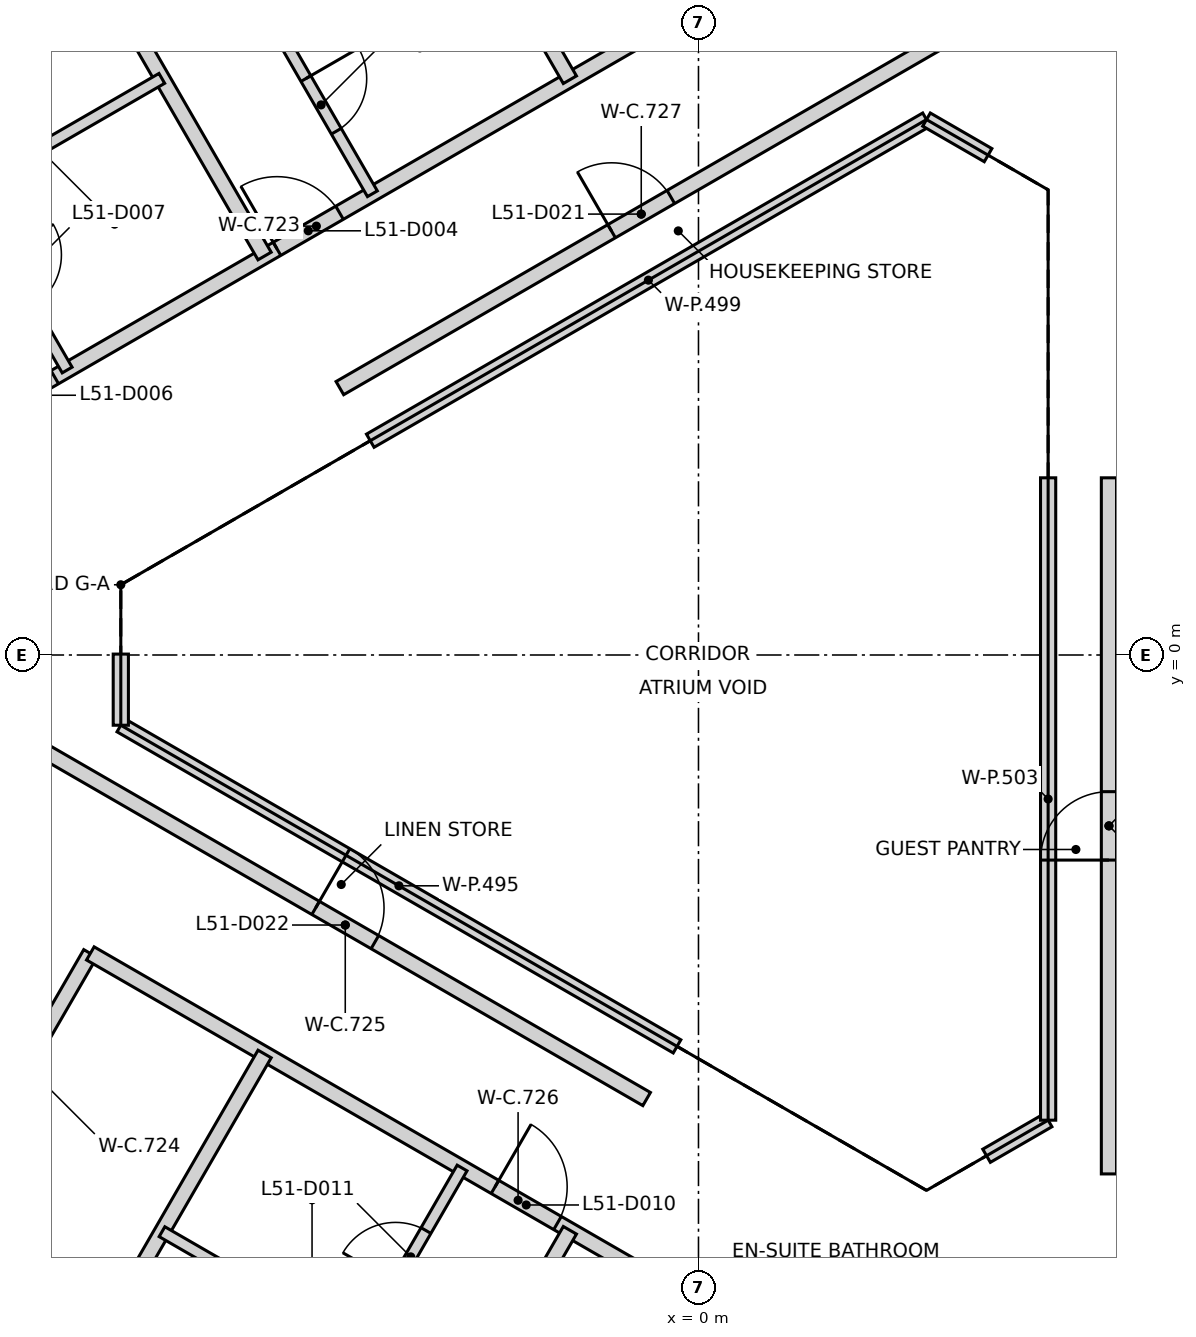
"""IFC4 building model, lengths in metres.
Left out: names, types, materials, properties, quantities, classifications, styles, units other than length and angle.
Written with IfcOpenShell. Run it as: python <this file> out.ifc"""

import sys

from ifc_helpers import new_model, si_unit, direction, frame, frame_2d, origin, place, context, subcontext, project, spatial, rectangle, extrude, element, fill, save


model = new_model("IFC4")
c1 = context("Model", 3, precision=1e-05, world=origin(), true_north=direction((0.0, 1.0)))
c2 = subcontext(c1, "Body", "Model", "MODEL_VIEW")
j1 = project(units=[si_unit("LENGTHUNIT", "METRE"), si_unit("PLANEANGLEUNIT", "RADIAN")], contexts=[c1])
p1 = place(None, origin())
s1 = spatial("IfcSite", under=j1, at=p1, CompositionType="ELEMENT")
p2 = place(p1, origin())
s2 = spatial("IfcBuilding", under=s1, at=p2, CompositionType="ELEMENT")
p3 = place(p2, frame((0.0, 0.0, 204.4)))
s3 = spatial("IfcBuildingStorey", under=s2, at=p3, CompositionType="ELEMENT", Elevation=204.4)
p4 = place(p3, frame((10.42, 6.498, 0.0), z_axis=(0.0, 0.0, 1.0), x_axis=(-0.866021906294, 0.500006057782, 0.0)))
e1 = element("IfcWall", 1, at=p4, inside=s3, PredefinedType="SHEAR", context=c2, shape_type="SweptSolid", body=[
    extrude(rectangle(XDim=11.55, YDim=0.25, at=frame_2d((5.775, 0.0))), origin(), (0.0, 0.0, 1.0), 3.25),
])
p5 = place(p4, frame((10.025, 0.0, 0.0)))
e2 = element("IfcOpeningElement", 2, at=p5, cuts=e1, PredefinedType="OPENING", context=c2, shape_type="SweptSolid", body=[
    extrude(rectangle(XDim=1.2, YDim=2.1, at=frame_2d((0.6, 1.05))), frame((0.0, 0.135, 0.0), z_axis=(0.0, -1.0, 0.0), x_axis=(1.0, 0.0, 0.0)), (0.0, 0.0, 1.0), 0.27),
])
p6 = place(p4, frame((8.725, 0.0, 0.0)))
e3 = element("IfcOpeningElement", 3, at=p6, cuts=e1, PredefinedType="OPENING", context=c2, shape_type="SweptSolid", body=[
    extrude(rectangle(XDim=1.2, YDim=2.1, at=frame_2d((0.6, 1.05))), frame((0.0, 0.135, 0.0), z_axis=(0.0, -1.0, 0.0), x_axis=(1.0, 0.0, 0.0)), (0.0, 0.0, 1.0), 0.27),
])
p7 = place(p3, frame((0.417, -12.273, 0.0), z_axis=(0.0, 0.0, 1.0), x_axis=(0.866021906294, 0.500006057782, 0.0)))
e4 = element("IfcWall", 4, at=p7, inside=s3, PredefinedType="SHEAR", context=c2, shape_type="SweptSolid", body=[
    extrude(rectangle(XDim=11.55, YDim=0.25, at=frame_2d((5.775, 0.0))), origin(), (0.0, 0.0, 1.0), 3.25),
])
p8 = place(p7, frame((10.025, 0.0, 0.0)))
e5 = element("IfcOpeningElement", 5, at=p8, cuts=e4, PredefinedType="OPENING", context=c2, shape_type="SweptSolid", body=[
    extrude(rectangle(XDim=1.2, YDim=2.1, at=frame_2d((0.6, 1.05))), frame((0.0, 0.135, 0.0), z_axis=(0.0, -1.0, 0.0), x_axis=(1.0, 0.0, 0.0)), (0.0, 0.0, 1.0), 0.27),
])
p9 = place(p7, frame((8.725, 0.0, 0.0)))
e6 = element("IfcOpeningElement", 6, at=p9, cuts=e4, PredefinedType="OPENING", context=c2, shape_type="SweptSolid", body=[
    extrude(rectangle(XDim=1.2, YDim=2.1, at=frame_2d((0.6, 1.05))), frame((0.0, 0.135, 0.0), z_axis=(0.0, -1.0, 0.0), x_axis=(1.0, 0.0, 0.0)), (0.0, 0.0, 1.0), 0.27),
])
p10 = place(p3, frame((-10.652, 2.394, 0.0), z_axis=(0.0, 0.0, 1.0), x_axis=(0.866016271077, 0.500015817979, 0.0)))
e7 = element("IfcWall", 7, at=p10, inside=s3, PredefinedType="PARTITIONING", context=c2, shape_type="SweptSolid", body=[
    extrude(rectangle(XDim=12.991, YDim=0.2, at=frame_2d((6.495, 0.0))), origin(), (0.0, 0.0, 1.0), 3.25),
])
p11 = place(p10, frame((5.898, 0.0, 0.0)))
e8 = element("IfcOpeningElement", 8, at=p11, cuts=e7, PredefinedType="OPENING", context=c2, shape_type="SweptSolid", body=[
    extrude(rectangle(XDim=0.95, YDim=2.1, at=frame_2d((0.475, 1.05))), frame((0.0, 0.11, 0.0), z_axis=(0.0, -1.0, 0.0), x_axis=(1.0, 0.0, 0.0)), (0.0, 0.0, 1.0), 0.22),
])
p12 = place(p10, frame((1.571, 0.0, 0.0)))
e9 = element("IfcOpeningElement", 9, at=p12, cuts=e7, PredefinedType="OPENING", context=c2, shape_type="SweptSolid", body=[
    extrude(rectangle(XDim=0.95, YDim=2.1, at=frame_2d((0.475, 1.05))), frame((0.0, 0.11, 0.0), z_axis=(0.0, -1.0, 0.0), x_axis=(1.0, 0.0, 0.0)), (0.0, 0.0, 1.0), 0.22),
])
p13 = place(p3, frame((-9.697, -6.864, 0.0), z_axis=(0.0, 0.0, 1.0), x_axis=(0.499955030392, 0.866051365443, 0.0)))
e10 = element("IfcWall", 10, at=p13, inside=s3, PredefinedType="PARTITIONING", context=c2, shape_type="SweptSolid", body=[
    extrude(rectangle(XDim=3.392, YDim=0.2, at=frame_2d((1.696, 0.0))), origin(), (0.0, 0.0, 1.0), 3.25),
])
p14 = place(p13, frame((1.196, 0.0, 0.0)))
e11 = element("IfcOpeningElement", 11, at=p14, cuts=e10, PredefinedType="OPENING", context=c2, shape_type="SweptSolid", body=[
    extrude(rectangle(XDim=1.0, YDim=2.1, at=frame_2d((0.5, 1.05))), frame((0.0, 0.11, 0.0), z_axis=(0.0, -1.0, 0.0), x_axis=(1.0, 0.0, 0.0)), (0.0, 0.0, 1.0), 0.22),
])
p15 = place(p3, frame((-8.612, -1.263, 0.0), z_axis=(0.0, 0.0, 1.0), x_axis=(0.865996442381, -0.500050159267, 0.0)))
e12 = element("IfcWall", 12, at=p15, inside=s3, PredefinedType="PARTITIONING", context=c2, shape_type="SweptSolid", body=[
    extrude(rectangle(XDim=9.157, YDim=0.2, at=frame_2d((4.579, 0.0))), origin(), (0.0, 0.0, 1.0), 3.25),
])
p16 = place(p15, frame((4.128, 0.0, 0.0)))
e13 = element("IfcOpeningElement", 13, at=p16, cuts=e12, PredefinedType="OPENING", context=c2, shape_type="SweptSolid", body=[
    extrude(rectangle(XDim=0.9, YDim=2.1, at=frame_2d((0.45, 1.05))), frame((0.0, 0.11, 0.0), z_axis=(0.0, -1.0, 0.0), x_axis=(1.0, 0.0, 0.0)), (0.0, 0.0, 1.0), 0.22),
])
p17 = place(p3, frame((-8.001, -3.926, 0.0), z_axis=(0.0, 0.0, 1.0), x_axis=(0.866131158271, -0.499816783104, 0.0)))
e14 = element("IfcWall", 14, at=p17, inside=s3, PredefinedType="PARTITIONING", context=c2, shape_type="SweptSolid", body=[
    extrude(rectangle(XDim=12.995, YDim=0.2, at=frame_2d((6.498, 0.0))), origin(), (0.0, 0.0, 1.0), 3.25),
])
p18 = place(p17, frame((6.146, 0.0, 0.0)))
e15 = element("IfcOpeningElement", 15, at=p18, cuts=e14, PredefinedType="OPENING", context=c2, shape_type="SweptSolid", body=[
    extrude(rectangle(XDim=0.95, YDim=2.1, at=frame_2d((0.475, 1.05))), frame((0.0, 0.11, 0.0), z_axis=(0.0, -1.0, 0.0), x_axis=(1.0, 0.0, 0.0)), (0.0, 0.0, 1.0), 0.22),
])
p19 = place(p17, frame((10.472, 0.0, 0.0)))
e16 = element("IfcOpeningElement", 16, at=p19, cuts=e14, PredefinedType="OPENING", context=c2, shape_type="SweptSolid", body=[
    extrude(rectangle(XDim=0.95, YDim=2.1, at=frame_2d((0.475, 1.05))), frame((0.0, 0.11, 0.0), z_axis=(0.0, -1.0, 0.0), x_axis=(1.0, 0.0, 0.0)), (0.0, 0.0, 1.0), 0.22),
])
p20 = place(p3, frame((-4.718, 3.511, 0.0), z_axis=(0.0, 0.0, 1.0), x_axis=(0.865989775611, 0.500061704731, 0.0)))
e17 = element("IfcWall", 17, at=p20, inside=s3, PredefinedType="PARTITIONING", context=c2, shape_type="SweptSolid", body=[
    extrude(rectangle(XDim=9.157, YDim=0.2, at=frame_2d((4.579, 0.0))), origin(), (0.0, 0.0, 1.0), 3.25),
])
p21 = place(p20, frame((4.128, 0.0, 0.0)))
e18 = element("IfcOpeningElement", 18, at=p21, cuts=e17, PredefinedType="OPENING", context=c2, shape_type="SweptSolid", body=[
    extrude(rectangle(XDim=0.9, YDim=2.1, at=frame_2d((0.45, 1.05))), frame((0.0, 0.11, 0.0), z_axis=(0.0, -1.0, 0.0), x_axis=(1.0, 0.0, 0.0)), (0.0, 0.0, 1.0), 0.22),
])
p22 = place(p3, frame((5.4, -6.827, 0.0), z_axis=(0.0, 0.0, 1.0), x_axis=(0.0, 1.0, 0.0)))
e19 = element("IfcWall", 19, at=p22, inside=s3, PredefinedType="PARTITIONING", context=c2, shape_type="SweptSolid", body=[
    extrude(rectangle(XDim=9.158, YDim=0.2, at=frame_2d((4.579, 0.0))), origin(), (0.0, 0.0, 1.0), 3.25),
])
p23 = place(p22, frame((4.129, 0.0, 0.0)))
e20 = element("IfcOpeningElement", 20, at=p23, cuts=e19, PredefinedType="OPENING", context=c2, shape_type="SweptSolid", body=[
    extrude(rectangle(XDim=0.9, YDim=2.1, at=frame_2d((0.45, 1.05))), frame((0.0, 0.11, 0.0), z_axis=(0.0, -1.0, 0.0), x_axis=(1.0, 0.0, 0.0)), (0.0, 0.0, 1.0), 0.22),
])
for number, where, z_axis, x_axis in (
    (21, (-11.661, -15.561, 0.0), (0.0, 0.0, 1.0), (0.5, 0.866, 0.0)),
    (22, (-11.661, 15.561, 0.0), (0.0, 0.0, 1.0), (0.5, -0.866, 0.0)),
):
    element("IfcWall", number, at=place(p3, frame(where, z_axis=z_axis, x_axis=x_axis)), inside=s3, PredefinedType="PARTITIONING", context=c2, shape_type="SweptSolid", body=[
        extrude(rectangle(XDim=11.907, YDim=0.2, at=frame_2d((5.953, 0.0))), origin(), (0.0, 0.0, 1.0), 3.25),
    ])
p24 = place(p3, frame((-7.6, -0.924, 0.0), z_axis=(0.0, 0.0, 1.0), x_axis=(0.866038843867, -0.499976720371, 0.0)))
e23 = element("IfcWall", 23, at=p24, inside=s3, PredefinedType="PARTITIONING", context=c2, shape_type="SweptSolid", body=[
    extrude(rectangle(XDim=8.45, YDim=0.2, at=frame_2d((4.225, 0.0))), origin(), (0.0, 0.0, 1.0), 3.25),
])
p25 = place(p3, frame((-7.6, -0.924, 0.0), z_axis=(0.0, 0.0, 1.0), x_axis=(0.0, 1.0, 0.0)))
e24 = element("IfcWall", 24, at=p25, inside=s3, PredefinedType="PARTITIONING", context=c2, shape_type="SweptSolid", body=[
    extrude(rectangle(XDim=0.936, YDim=0.2, at=frame_2d((0.468, 0.0))), origin(), (0.0, 0.0, 1.0), 3.25),
])
for number, where, z_axis, x_axis in (
    (25, (-7.646, -17.879, 0.0), (0.0, 0.0, 1.0), (0.5, 0.866, 0.0)),
    (26, (-7.646, 17.879, 0.0), (0.0, 0.0, 1.0), (0.5, -0.866, 0.0)),
):
    element("IfcWall", number, at=place(p3, frame(where, z_axis=z_axis, x_axis=x_axis)), inside=s3, PredefinedType="PARTITIONING", context=c2, shape_type="SweptSolid", body=[
        extrude(rectangle(XDim=11.906, YDim=0.2, at=frame_2d((5.953, 0.0))), origin(), (0.0, 0.0, 1.0), 3.25),
    ])
p26 = place(p3, frame((-4.318, 2.819, 0.0), z_axis=(0.0, 0.0, 1.0), x_axis=(0.866038843867, 0.499976720371, 0.0)))
e27 = element("IfcWall", 27, at=p26, inside=s3, PredefinedType="PARTITIONING", context=c2, shape_type="SweptSolid", body=[
    extrude(rectangle(XDim=8.45, YDim=0.2, at=frame_2d((4.225, 0.0))), origin(), (0.0, 0.0, 1.0), 3.25),
])
p27 = place(p3, frame((3.0, 7.044, 0.0), z_axis=(0.0, 0.0, 1.0), x_axis=(0.865872609263, -0.500264554538, 0.0)))
e28 = element("IfcWall", 28, at=p27, inside=s3, PredefinedType="PARTITIONING", context=c2, shape_type="SweptSolid", body=[
    extrude(rectangle(XDim=0.936, YDim=0.2, at=frame_2d((0.468, 0.0))), origin(), (0.0, 0.0, 1.0), 3.25),
])
p28 = place(p3, frame((3.79, -6.588, 0.0), z_axis=(0.0, 0.0, 1.0), x_axis=(0.865985641702, 0.500068863623, 0.0)))
e29 = element("IfcWall", 29, at=p28, inside=s3, PredefinedType="PARTITIONING", context=c2, shape_type="SweptSolid", body=[
    extrude(rectangle(XDim=0.935, YDim=0.2, at=frame_2d((0.468, 0.0))), origin(), (0.0, 0.0, 1.0), 3.25),
])
p29 = place(p3, frame((4.6, -6.12, 0.0), z_axis=(0.0, 0.0, 1.0), x_axis=(0.0, 1.0, 0.0)))
e30 = element("IfcWall", 30, at=p29, inside=s3, PredefinedType="PARTITIONING", context=c2, shape_type="SweptSolid", body=[
    extrude(rectangle(XDim=8.451, YDim=0.2, at=frame_2d((4.226, 0.0))), origin(), (0.0, 0.0, 1.0), 3.25),
])
p30 = place(p3, frame((-9.655, 6.085, 0.0), z_axis=(0.0, 0.0, 1.0), x_axis=(0.500129820725, -0.865950438779, 0.0)))
e31 = element("IfcWall", 31, at=p30, inside=s3, PredefinedType="PARTITIONING", context=c2, shape_type="SweptSolid", body=[
    extrude(rectangle(XDim=2.698, YDim=0.15, at=frame_2d((1.349, 0.0))), origin(), (0.0, 0.0, 1.0), 3.25),
])
p31 = place(p30, frame((0.948, 0.0, 0.0)))
e32 = element("IfcOpeningElement", 32, at=p31, cuts=e31, PredefinedType="OPENING", context=c2, shape_type="SweptSolid", body=[
    extrude(rectangle(XDim=0.8, YDim=2.1, at=frame_2d((0.4, 1.05))), frame((0.0, 0.085, 0.0), z_axis=(0.0, -1.0, 0.0), x_axis=(1.0, 0.0, 0.0)), (0.0, 0.0, 1.0), 0.17),
])
p32 = place(p3, frame((-9.653, 6.089, 0.0), z_axis=(0.0, 0.0, 1.0), x_axis=(0.866021254674, 0.500007186402, 0.0)))
e33 = element("IfcWall", 33, at=p32, inside=s3, PredefinedType="PARTITIONING", context=c2, shape_type="SweptSolid", body=[
    extrude(rectangle(XDim=2.994, YDim=0.15, at=frame_2d((1.497, 0.0))), origin(), (0.0, 0.0, 1.0), 3.25),
])
p33 = place(p3, frame((-7.058, -7.587, 0.0), z_axis=(0.0, 0.0, 1.0), x_axis=(0.866031096941, -0.499990139034, 0.0)))
e34 = element("IfcWall", 34, at=p33, inside=s3, PredefinedType="PARTITIONING", context=c2, shape_type="SweptSolid", body=[
    extrude(rectangle(XDim=3.0, YDim=0.15, at=frame_2d((1.5, 0.0))), origin(), (0.0, 0.0, 1.0), 3.25),
])
p34 = place(p3, frame((-5.64, 8.406, 0.0), z_axis=(0.0, 0.0, 1.0), x_axis=(0.50001992892, -0.866013897511, 0.0)))
e35 = element("IfcWall", 35, at=p34, inside=s3, PredefinedType="PARTITIONING", context=c2, shape_type="SweptSolid", body=[
    extrude(rectangle(XDim=2.7, YDim=0.15, at=frame_2d((1.35, 0.0))), origin(), (0.0, 0.0, 1.0), 3.25),
])
p35 = place(p34, frame((0.95, 0.0, 0.0)))
e36 = element("IfcOpeningElement", 36, at=p35, cuts=e35, PredefinedType="OPENING", context=c2, shape_type="SweptSolid", body=[
    extrude(rectangle(XDim=0.8, YDim=2.1, at=frame_2d((0.4, 1.05))), frame((0.0, 0.085, 0.0), z_axis=(0.0, -1.0, 0.0), x_axis=(1.0, 0.0, 0.0)), (0.0, 0.0, 1.0), 0.17),
])
p36 = place(p3, frame((-4.46, -9.087, 0.0), z_axis=(0.0, 0.0, 1.0), x_axis=(0.50001992892, 0.866013897511, 0.0)))
e37 = element("IfcWall", 37, at=p36, inside=s3, PredefinedType="PARTITIONING", context=c2, shape_type="SweptSolid", body=[
    extrude(rectangle(XDim=2.7, YDim=0.15, at=frame_2d((1.35, 0.0))), origin(), (0.0, 0.0, 1.0), 3.25),
])
p37 = place(p36, frame((0.95, 0.0, 0.0)))
e38 = element("IfcOpeningElement", 38, at=p37, cuts=e37, PredefinedType="OPENING", context=c2, shape_type="SweptSolid", body=[
    extrude(rectangle(XDim=0.8, YDim=2.1, at=frame_2d((0.4, 1.05))), frame((0.0, 0.085, 0.0), z_axis=(0.0, -1.0, 0.0), x_axis=(1.0, 0.0, 0.0)), (0.0, 0.0, 1.0), 0.17),
])
p38 = place(p11, origin())
e39 = element("IfcDoor", 39, at=p38, inside=s3, OperationType="SINGLE_SWING_LEFT", PredefinedType="DOOR", context=c2, shape_type="SweptSolid", body=[
    extrude(rectangle(XDim=0.95, YDim=2.1, at=frame_2d((0.475, 1.05))), frame((0.0, 0.025, 0.0), z_axis=(0.0, -1.0, 0.0), x_axis=(1.0, 0.0, 0.0)), (0.0, 0.0, 1.0), 0.05),
])
fill(e8, e39)
p39 = place(p35, origin())
e40 = element("IfcDoor", 40, at=p39, inside=s3, OperationType="SINGLE_SWING_LEFT", PredefinedType="DOOR", context=c2, shape_type="SweptSolid", body=[
    extrude(rectangle(XDim=0.8, YDim=2.1, at=frame_2d((0.4, 1.05))), frame((0.0, 0.025, 0.0), z_axis=(0.0, -1.0, 0.0), x_axis=(1.0, 0.0, 0.0)), (0.0, 0.0, 1.0), 0.05),
])
fill(e36, e40)
p40 = place(p12, origin())
e41 = element("IfcDoor", 41, at=p40, inside=s3, OperationType="SINGLE_SWING_LEFT", PredefinedType="DOOR", context=c2, shape_type="SweptSolid", body=[
    extrude(rectangle(XDim=0.95, YDim=2.1, at=frame_2d((0.475, 1.05))), frame((0.0, 0.025, 0.0), z_axis=(0.0, -1.0, 0.0), x_axis=(1.0, 0.0, 0.0)), (0.0, 0.0, 1.0), 0.05),
])
fill(e9, e41)
p41 = place(p18, frame((0.95, 0.0, 0.0), z_axis=(0.0, 0.0, 1.0), x_axis=(-1.0, 0.0, 0.0)))
e42 = element("IfcDoor", 42, at=p41, inside=s3, OperationType="SINGLE_SWING_LEFT", PredefinedType="DOOR", context=c2, shape_type="SweptSolid", body=[
    extrude(rectangle(XDim=0.95, YDim=2.1, at=frame_2d((0.475, 1.05))), frame((0.0, 0.025, 0.0), z_axis=(0.0, -1.0, 0.0), x_axis=(1.0, 0.0, 0.0)), (0.0, 0.0, 1.0), 0.05),
])
fill(e15, e42)
p42 = place(p37, origin())
e43 = element("IfcDoor", 43, at=p42, inside=s3, OperationType="SINGLE_SWING_LEFT", PredefinedType="DOOR", context=c2, shape_type="SweptSolid", body=[
    extrude(rectangle(XDim=0.8, YDim=2.1, at=frame_2d((0.4, 1.05))), frame((0.0, 0.025, 0.0), z_axis=(0.0, -1.0, 0.0), x_axis=(1.0, 0.0, 0.0)), (0.0, 0.0, 1.0), 0.05),
])
fill(e38, e43)
p43 = place(p23, origin())
e44 = element("IfcDoor", 44, at=p43, inside=s3, OperationType="SINGLE_SWING_LEFT", PredefinedType="DOOR", context=c2, shape_type="SweptSolid", body=[
    extrude(rectangle(XDim=0.9, YDim=2.1, at=frame_2d((0.45, 1.05))), frame((0.0, 0.025, 0.0), z_axis=(0.0, -1.0, 0.0), x_axis=(1.0, 0.0, 0.0)), (0.0, 0.0, 1.0), 0.05),
])
fill(e20, e44)
p44 = place(p21, frame((0.9, 0.0, 0.0), z_axis=(0.0, 0.0, 1.0), x_axis=(-1.0, 0.0, 0.0)))
e45 = element("IfcDoor", 45, at=p44, inside=s3, OperationType="SINGLE_SWING_LEFT", PredefinedType="DOOR", context=c2, shape_type="SweptSolid", body=[
    extrude(rectangle(XDim=0.9, YDim=2.1, at=frame_2d((0.45, 1.05))), frame((0.0, 0.025, 0.0), z_axis=(0.0, -1.0, 0.0), x_axis=(1.0, 0.0, 0.0)), (0.0, 0.0, 1.0), 0.05),
])
fill(e18, e45)
p45 = place(p16, origin())
e46 = element("IfcDoor", 46, at=p45, inside=s3, OperationType="SINGLE_SWING_LEFT", PredefinedType="DOOR", context=c2, shape_type="SweptSolid", body=[
    extrude(rectangle(XDim=0.9, YDim=2.1, at=frame_2d((0.45, 1.05))), frame((0.0, 0.025, 0.0), z_axis=(0.0, -1.0, 0.0), x_axis=(1.0, 0.0, 0.0)), (0.0, 0.0, 1.0), 0.05),
])
fill(e13, e46)
save(model, sys.argv[1])
